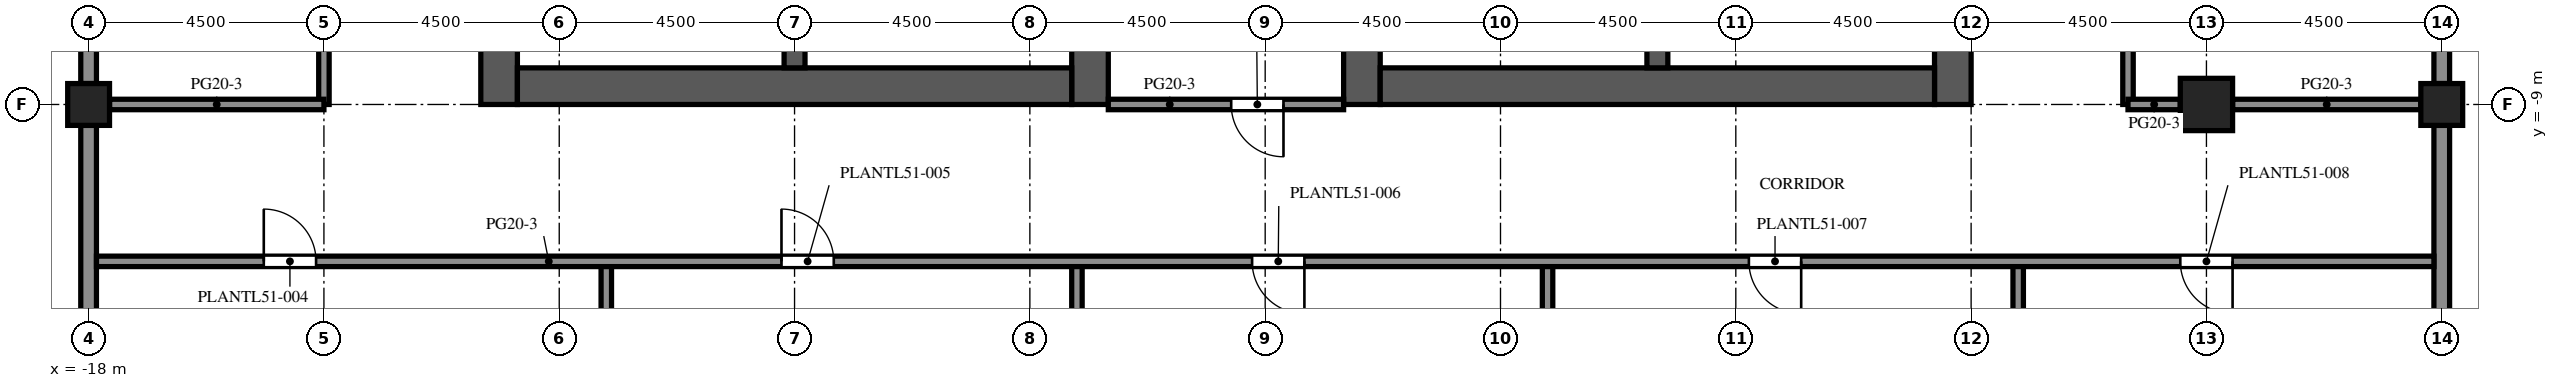
"""IFC4 building model, lengths in metres.
Left out: names, types, materials, properties, quantities, classifications, styles, units other than length and angle.
Written with IfcOpenShell. Run it as: python <this file> out.ifc"""

import sys

from ifc_helpers import new_model, si_unit, direction, frame, frame_2d, origin, origin_2d, place, context, subcontext, project, spatial, rectangle, extrude, element, fill, save


model = new_model("IFC4")
c1 = context("Model", 3, precision=1e-05, world=origin(), true_north=direction((0.0, 1.0)))
c2 = subcontext(c1, "Body", "Model", "MODEL_VIEW")
j1 = project(units=[si_unit("LENGTHUNIT", "METRE"), si_unit("PLANEANGLEUNIT", "RADIAN")], contexts=[c1])
p1 = place(None, origin())
s1 = spatial("IfcSite", under=j1, at=p1, CompositionType="ELEMENT")
p2 = place(p1, origin())
s2 = spatial("IfcBuilding", under=s1, at=p2, CompositionType="ELEMENT")
p3 = place(p2, frame((0.0, 0.0, 226.2)))
s3 = spatial("IfcBuildingStorey", under=s2, at=p3, CompositionType="ELEMENT", Elevation=226.2)
for number, where, z_axis, x_axis in (
    (1, (-18.0, -9.0, -0.6), (0.0, 0.0, 1.0), (1.0, 0.0, 0.0)),
    (2, (27.0, -9.0, -0.6), (0.0, 0.0, 1.0), (1.0, 0.0, 0.0)),
):
    element("IfcColumn", number, at=place(p3, frame(where, z_axis=z_axis, x_axis=x_axis)), inside=s3, PredefinedType="COLUMN", context=c2, shape_type="SweptSolid", body=[
        extrude(rectangle(XDim=0.8, YDim=0.8, at=origin_2d()), origin(), (0.0, 0.0, 1.0), 6.0),
    ])
p4 = place(p3, frame((22.5, -9.0, 0.0), z_axis=(0.0, 0.0, 1.0), x_axis=(1.0, 0.0, 0.0)))
e3 = element("IfcColumn", 3, at=p4, inside=s3, PredefinedType="COLUMN", context=c2, shape_type="SweptSolid", body=[
    extrude(rectangle(XDim=1.0, YDim=1.0, at=origin_2d()), origin(), (0.0, 0.0, 1.0), 5.4),
])
p5 = place(p3, frame((-10.15, -9.0, 0.0), z_axis=(0.0, 0.0, 1.0), x_axis=(0.0, 1.0, 0.0)))
e4 = element("IfcWall", 4, at=p5, inside=s3, PredefinedType="SHEAR", context=c2, shape_type="SweptSolid", body=[
    extrude(rectangle(XDim=27.5, YDim=0.7, at=frame_2d((13.75, 0.0))), origin(), (0.0, 0.0, 1.0), 5.4),
])
p6 = place(p5, frame((12.55, 0.0, 0.0)))
e5 = element("IfcOpeningElement", 5, at=p6, cuts=e4, PredefinedType="OPENING", context=c2, shape_type="SweptSolid", body=[
    extrude(rectangle(XDim=2.4, YDim=2.4, at=frame_2d((1.2, 1.2))), frame((0.0, 0.36, 0.0), z_axis=(0.0, -1.0, 0.0), x_axis=(1.0, 0.0, 0.0)), (0.0, 0.0, 1.0), 0.72),
])
p7 = place(p5, frame((6.825, 0.0, 0.0)))
e6 = element("IfcOpeningElement", 6, at=p7, cuts=e4, PredefinedType="OPENING", context=c2, shape_type="SweptSolid", body=[
    extrude(rectangle(XDim=1.2, YDim=2.1, at=frame_2d((0.6, 1.05))), frame((0.0, 0.36, 0.0), z_axis=(0.0, -1.0, 0.0), x_axis=(1.0, 0.0, 0.0)), (0.0, 0.0, 1.0), 0.72),
])
p8 = place(p5, frame((19.475, 0.0, 0.0)))
e7 = element("IfcOpeningElement", 7, at=p8, cuts=e4, PredefinedType="OPENING", context=c2, shape_type="SweptSolid", body=[
    extrude(rectangle(XDim=1.2, YDim=2.1, at=frame_2d((0.6, 1.05))), frame((0.0, 0.36, 0.0), z_axis=(0.0, -1.0, 0.0), x_axis=(1.0, 0.0, 0.0)), (0.0, 0.0, 1.0), 0.72),
])
p9 = place(p3, frame((1.15, -9.0, 0.0), z_axis=(0.0, 0.0, 1.0), x_axis=(0.0, 1.0, 0.0)))
e8 = element("IfcWall", 8, at=p9, inside=s3, PredefinedType="SHEAR", context=c2, shape_type="SweptSolid", body=[
    extrude(rectangle(XDim=27.5, YDim=0.7, at=frame_2d((13.75, 0.0))), origin(), (0.0, 0.0, 1.0), 5.4),
])
p10 = place(p9, frame((12.55, 0.0, 0.0)))
e9 = element("IfcOpeningElement", 9, at=p10, cuts=e8, PredefinedType="OPENING", context=c2, shape_type="SweptSolid", body=[
    extrude(rectangle(XDim=2.4, YDim=2.4, at=frame_2d((1.2, 1.2))), frame((0.0, 0.36, 0.0), z_axis=(0.0, -1.0, 0.0), x_axis=(1.0, 0.0, 0.0)), (0.0, 0.0, 1.0), 0.72),
])
p11 = place(p9, frame((5.46, 0.0, 0.0)))
e10 = element("IfcOpeningElement", 10, at=p11, cuts=e8, PredefinedType="OPENING", context=c2, shape_type="SweptSolid", body=[
    extrude(rectangle(XDim=0.968, YDim=2.1, at=frame_2d((0.484, 1.05))), frame((0.0, 0.36, 0.0), z_axis=(0.0, -1.0, 0.0), x_axis=(1.0, 0.0, 0.0)), (0.0, 0.0, 1.0), 0.72),
])
p12 = place(p9, frame((23.54, 0.0, 0.0)))
e11 = element("IfcOpeningElement", 11, at=p12, cuts=e8, PredefinedType="OPENING", context=c2, shape_type="SweptSolid", body=[
    extrude(rectangle(XDim=1.2, YDim=2.1, at=frame_2d((0.6, 1.05))), frame((0.0, 0.36, 0.0), z_axis=(0.0, -1.0, 0.0), x_axis=(1.0, 0.0, 0.0)), (0.0, 0.0, 1.0), 0.72),
])
p13 = place(p3, frame((-9.8, -8.65, 0.0), z_axis=(0.0, 0.0, 1.0), x_axis=(1.0, 0.0, 0.0)))
e12 = element("IfcWall", 12, at=p13, inside=s3, PredefinedType="SHEAR", context=c2, shape_type="SweptSolid", body=[
    extrude(rectangle(XDim=10.6, YDim=0.7, at=frame_2d((5.3, 0.0))), origin(), (0.0, 0.0, 1.0), 5.4),
])
p14 = place(p3, frame((-4.5, -8.3, 0.0), z_axis=(0.0, 0.0, 1.0), x_axis=(0.0, 1.0, 0.0)))
e13 = element("IfcWall", 13, at=p14, inside=s3, PredefinedType="SHEAR", context=c2, shape_type="SweptSolid", body=[
    extrude(rectangle(XDim=7.6, YDim=0.4, at=frame_2d((3.8, 0.0))), origin(), (0.0, 0.0, 1.0), 5.4),
])
p15 = place(p3, frame((6.35, -9.0, 0.0), z_axis=(0.0, 0.0, 1.0), x_axis=(0.0, 1.0, 0.0)))
e14 = element("IfcWall", 14, at=p15, inside=s3, PredefinedType="SHEAR", context=c2, shape_type="SweptSolid", body=[
    extrude(rectangle(XDim=27.5, YDim=0.7, at=frame_2d((13.75, 0.0))), origin(), (0.0, 0.0, 1.0), 5.4),
])
p16 = place(p15, frame((12.55, 0.0, 0.0)))
e15 = element("IfcOpeningElement", 15, at=p16, cuts=e14, PredefinedType="OPENING", context=c2, shape_type="SweptSolid", body=[
    extrude(rectangle(XDim=2.4, YDim=2.4, at=frame_2d((1.2, 1.2))), frame((0.0, 0.36, 0.0), z_axis=(0.0, -1.0, 0.0), x_axis=(1.0, 0.0, 0.0)), (0.0, 0.0, 1.0), 0.72),
])
p17 = place(p15, frame((5.46, 0.0, 0.0)))
e16 = element("IfcOpeningElement", 16, at=p17, cuts=e14, PredefinedType="OPENING", context=c2, shape_type="SweptSolid", body=[
    extrude(rectangle(XDim=0.968, YDim=2.1, at=frame_2d((0.484, 1.05))), frame((0.0, 0.36, 0.0), z_axis=(0.0, -1.0, 0.0), x_axis=(1.0, 0.0, 0.0)), (0.0, 0.0, 1.0), 0.72),
])
p18 = place(p15, frame((23.54, 0.0, 0.0)))
e17 = element("IfcOpeningElement", 17, at=p18, cuts=e14, PredefinedType="OPENING", context=c2, shape_type="SweptSolid", body=[
    extrude(rectangle(XDim=1.2, YDim=2.1, at=frame_2d((0.6, 1.05))), frame((0.0, 0.36, 0.0), z_axis=(0.0, -1.0, 0.0), x_axis=(1.0, 0.0, 0.0)), (0.0, 0.0, 1.0), 0.72),
])
p19 = place(p3, frame((17.65, -9.0, 0.0), z_axis=(0.0, 0.0, 1.0), x_axis=(0.0, 1.0, 0.0)))
e18 = element("IfcWall", 18, at=p19, inside=s3, PredefinedType="SHEAR", context=c2, shape_type="SweptSolid", body=[
    extrude(rectangle(XDim=27.5, YDim=0.7, at=frame_2d((13.75, 0.0))), origin(), (0.0, 0.0, 1.0), 5.4),
])
p20 = place(p19, frame((12.55, 0.0, 0.0)))
e19 = element("IfcOpeningElement", 19, at=p20, cuts=e18, PredefinedType="OPENING", context=c2, shape_type="SweptSolid", body=[
    extrude(rectangle(XDim=2.4, YDim=2.4, at=frame_2d((1.2, 1.2))), frame((0.0, 0.36, 0.0), z_axis=(0.0, -1.0, 0.0), x_axis=(1.0, 0.0, 0.0)), (0.0, 0.0, 1.0), 0.72),
])
p21 = place(p19, frame((6.825, 0.0, 0.0)))
e20 = element("IfcOpeningElement", 20, at=p21, cuts=e18, PredefinedType="OPENING", context=c2, shape_type="SweptSolid", body=[
    extrude(rectangle(XDim=1.2, YDim=2.1, at=frame_2d((0.6, 1.05))), frame((0.0, 0.36, 0.0), z_axis=(0.0, -1.0, 0.0), x_axis=(1.0, 0.0, 0.0)), (0.0, 0.0, 1.0), 0.72),
])
p22 = place(p19, frame((19.475, 0.0, 0.0)))
e21 = element("IfcOpeningElement", 21, at=p22, cuts=e18, PredefinedType="OPENING", context=c2, shape_type="SweptSolid", body=[
    extrude(rectangle(XDim=1.2, YDim=2.1, at=frame_2d((0.6, 1.05))), frame((0.0, 0.36, 0.0), z_axis=(0.0, -1.0, 0.0), x_axis=(1.0, 0.0, 0.0)), (0.0, 0.0, 1.0), 0.72),
])
p23 = place(p3, frame((6.7, -8.65, 0.0), z_axis=(0.0, 0.0, 1.0), x_axis=(1.0, 0.0, 0.0)))
e22 = element("IfcWall", 22, at=p23, inside=s3, PredefinedType="SHEAR", context=c2, shape_type="SweptSolid", body=[
    extrude(rectangle(XDim=10.6, YDim=0.7, at=frame_2d((5.3, 0.0))), origin(), (0.0, 0.0, 1.0), 5.4),
])
p24 = place(p3, frame((12.0, -8.3, 0.0), z_axis=(0.0, 0.0, 1.0), x_axis=(0.0, 1.0, 0.0)))
e23 = element("IfcWall", 23, at=p24, inside=s3, PredefinedType="SHEAR", context=c2, shape_type="SweptSolid", body=[
    extrude(rectangle(XDim=7.6, YDim=0.4, at=frame_2d((3.8, 0.0))), origin(), (0.0, 0.0, 1.0), 5.4),
])
for number, where, z_axis, x_axis in (
    (24, (27.0, -9.4, 0.0), (0.0, 0.0, 1.0), (0.0, -1.0, 0.0)),
    (25, (27.0, -4.9, 0.0), (0.0, 0.0, 1.0), (0.0, -1.0, 0.0)),
    (26, (-18.0, -8.6, 0.0), (0.0, 0.0, 1.0), (0.0, 1.0, 0.0)),
    (27, (-18.0, -13.1, 0.0), (0.0, 0.0, 1.0), (0.0, 1.0, 0.0)),
):
    element("IfcWall", number, at=place(p3, frame(where, z_axis=z_axis, x_axis=x_axis)), inside=s3, PredefinedType="SOLIDWALL", context=c2, shape_type="SweptSolid", body=[
        extrude(rectangle(XDim=3.7, YDim=0.3, at=frame_2d((1.85, 0.0))), origin(), (0.0, 0.0, 1.0), 3.75),
    ])
for number, where, z_axis, x_axis in (
    (28, (-1.75, -8.3, 0.0), (0.0, 0.0, 1.0), (0.0, 1.0, 0.0)),
    (29, (9.25, -8.3, 0.0), (0.0, 0.0, 1.0), (0.0, 1.0, 0.0)),
):
    element("IfcWall", number, at=place(p3, frame(where, z_axis=z_axis, x_axis=x_axis)), inside=s3, PredefinedType="PARTITIONING", context=c2, shape_type="SweptSolid", body=[
        extrude(rectangle(XDim=4.56, YDim=0.1, at=frame_2d((2.28, 0.0))), origin(), (0.0, 0.0, 1.0), 4.95),
    ])
p25 = place(p3, frame((-13.5, -9.0, 0.0), z_axis=(0.0, 0.0, 1.0), x_axis=(0.0, 1.0, 0.0)))
e30 = element("IfcWall", 30, at=p25, inside=s3, PredefinedType="PARTITIONING", context=c2, shape_type="SweptSolid", body=[
    extrude(rectangle(XDim=27.5, YDim=0.2, at=frame_2d((13.75, 0.0))), origin(), (0.0, 0.0, 1.0), 4.95),
])
p26 = place(p25, frame((3.85, 0.0, 0.0)))
e31 = element("IfcOpeningElement", 31, at=p26, cuts=e30, PredefinedType="OPENING", context=c2, shape_type="SweptSolid", body=[
    extrude(rectangle(XDim=1.0, YDim=2.1, at=frame_2d((0.5, 1.05))), frame((0.0, 0.11, 0.0), z_axis=(0.0, -1.0, 0.0), x_axis=(1.0, 0.0, 0.0)), (0.0, 0.0, 1.0), 0.22),
])
p27 = place(p25, frame((12.6, 0.0, 0.0)))
e32 = element("IfcOpeningElement", 32, at=p27, cuts=e30, PredefinedType="OPENING", context=c2, shape_type="SweptSolid", body=[
    extrude(rectangle(XDim=1.0, YDim=2.1, at=frame_2d((0.5, 1.05))), frame((0.0, 0.11, 0.0), z_axis=(0.0, -1.0, 0.0), x_axis=(1.0, 0.0, 0.0)), (0.0, 0.0, 1.0), 0.22),
])
p28 = place(p25, frame((22.35, 0.0, 0.0)))
e33 = element("IfcOpeningElement", 33, at=p28, cuts=e30, PredefinedType="OPENING", context=c2, shape_type="SweptSolid", body=[
    extrude(rectangle(XDim=1.0, YDim=2.1, at=frame_2d((0.5, 1.05))), frame((0.0, 0.11, 0.0), z_axis=(0.0, -1.0, 0.0), x_axis=(1.0, 0.0, 0.0)), (0.0, 0.0, 1.0), 0.22),
])
for number, where, z_axis, x_axis in (
    (34, (-8.1, -22.35, 0.0), (0.0, 0.0, 1.0), (0.0, 1.0, 0.0)),
    (35, (0.9, -22.35, 0.0), (0.0, 0.0, 1.0), (0.0, 1.0, 0.0)),
    (36, (9.9, -22.35, 0.0), (0.0, 0.0, 1.0), (0.0, 1.0, 0.0)),
    (37, (18.9, -22.35, 0.0), (0.0, 0.0, 1.0), (0.0, 1.0, 0.0)),
):
    element("IfcWall", number, at=place(p3, frame(where, z_axis=z_axis, x_axis=x_axis)), inside=s3, PredefinedType="PARTITIONING", context=c2, shape_type="SweptSolid", body=[
        extrude(rectangle(XDim=10.35, YDim=0.2, at=frame_2d((5.175, 0.0))), origin(), (0.0, 0.0, 1.0), 4.95),
    ])
p29 = place(p3, frame((21.0, 18.5, 0.0), z_axis=(0.0, 0.0, 1.0), x_axis=(0.0, -1.0, 0.0)))
e38 = element("IfcWall", 38, at=p29, inside=s3, PredefinedType="PARTITIONING", context=c2, shape_type="SweptSolid", body=[
    extrude(rectangle(XDim=27.5, YDim=0.2, at=frame_2d((13.75, 0.0))), origin(), (0.0, 0.0, 1.0), 4.95),
])
p30 = place(p29, frame((21.4, 0.0, 0.0)))
e39 = element("IfcOpeningElement", 39, at=p30, cuts=e38, PredefinedType="OPENING", context=c2, shape_type="SweptSolid", body=[
    extrude(rectangle(XDim=1.0, YDim=2.1, at=frame_2d((0.5, 1.05))), frame((0.0, 0.11, 0.0), z_axis=(0.0, -1.0, 0.0), x_axis=(1.0, 0.0, 0.0)), (0.0, 0.0, 1.0), 0.22),
])
p31 = place(p29, frame((12.65, 0.0, 0.0)))
e40 = element("IfcOpeningElement", 40, at=p31, cuts=e38, PredefinedType="OPENING", context=c2, shape_type="SweptSolid", body=[
    extrude(rectangle(XDim=1.0, YDim=2.1, at=frame_2d((0.5, 1.05))), frame((0.0, 0.11, 0.0), z_axis=(0.0, -1.0, 0.0), x_axis=(1.0, 0.0, 0.0)), (0.0, 0.0, 1.0), 0.22),
])
p32 = place(p29, frame((5.15, 0.0, 0.0)))
e41 = element("IfcOpeningElement", 41, at=p32, cuts=e38, PredefinedType="OPENING", context=c2, shape_type="SweptSolid", body=[
    extrude(rectangle(XDim=1.0, YDim=2.1, at=frame_2d((0.5, 1.05))), frame((0.0, 0.11, 0.0), z_axis=(0.0, -1.0, 0.0), x_axis=(1.0, 0.0, 0.0)), (0.0, 0.0, 1.0), 0.22),
])
p33 = place(p3, frame((26.85, -12.0, 0.0), z_axis=(0.0, 0.0, 1.0), x_axis=(-1.0, 0.0, 0.0)))
e42 = element("IfcWall", 42, at=p33, inside=s3, PredefinedType="PARTITIONING", context=c2, shape_type="SweptSolid", body=[
    extrude(rectangle(XDim=44.7, YDim=0.2, at=frame_2d((22.35, 0.0))), origin(), (0.0, 0.0, 1.0), 4.95),
])
p34 = place(p33, frame((40.5, 0.0, 0.0)))
e43 = element("IfcOpeningElement", 43, at=p34, cuts=e42, PredefinedType="OPENING", context=c2, shape_type="SweptSolid", body=[
    extrude(rectangle(XDim=1.0, YDim=2.1, at=frame_2d((0.5, 1.05))), frame((0.0, 0.11, 0.0), z_axis=(0.0, -1.0, 0.0), x_axis=(1.0, 0.0, 0.0)), (0.0, 0.0, 1.0), 0.22),
])
p35 = place(p33, frame((30.6, 0.0, 0.0)))
e44 = element("IfcOpeningElement", 44, at=p35, cuts=e42, PredefinedType="OPENING", context=c2, shape_type="SweptSolid", body=[
    extrude(rectangle(XDim=1.0, YDim=2.1, at=frame_2d((0.5, 1.05))), frame((0.0, 0.11, 0.0), z_axis=(0.0, -1.0, 0.0), x_axis=(1.0, 0.0, 0.0)), (0.0, 0.0, 1.0), 0.22),
])
p36 = place(p33, frame((21.6, 0.0, 0.0)))
e45 = element("IfcOpeningElement", 45, at=p36, cuts=e42, PredefinedType="OPENING", context=c2, shape_type="SweptSolid", body=[
    extrude(rectangle(XDim=1.0, YDim=2.1, at=frame_2d((0.5, 1.05))), frame((0.0, 0.11, 0.0), z_axis=(0.0, -1.0, 0.0), x_axis=(1.0, 0.0, 0.0)), (0.0, 0.0, 1.0), 0.22),
])
p37 = place(p33, frame((12.1, 0.0, 0.0)))
e46 = element("IfcOpeningElement", 46, at=p37, cuts=e42, PredefinedType="OPENING", context=c2, shape_type="SweptSolid", body=[
    extrude(rectangle(XDim=1.0, YDim=2.1, at=frame_2d((0.5, 1.05))), frame((0.0, 0.11, 0.0), z_axis=(0.0, -1.0, 0.0), x_axis=(1.0, 0.0, 0.0)), (0.0, 0.0, 1.0), 0.22),
])
p38 = place(p33, frame((3.85, 0.0, 0.0)))
e47 = element("IfcOpeningElement", 47, at=p38, cuts=e42, PredefinedType="OPENING", context=c2, shape_type="SweptSolid", body=[
    extrude(rectangle(XDim=1.0, YDim=2.1, at=frame_2d((0.5, 1.05))), frame((0.0, 0.11, 0.0), z_axis=(0.0, -1.0, 0.0), x_axis=(1.0, 0.0, 0.0)), (0.0, 0.0, 1.0), 0.22),
])
p39 = place(p3, frame((-17.6, -9.0, 0.0), z_axis=(0.0, 0.0, 1.0), x_axis=(1.0, 0.0, 0.0)))
e48 = element("IfcWall", 48, at=p39, inside=s3, PredefinedType="PARTITIONING", context=c2, shape_type="SweptSolid", body=[
    extrude(rectangle(XDim=4.1, YDim=0.2, at=frame_2d((2.05, 0.0))), origin(), (0.0, 0.0, 1.0), 4.95),
])
p40 = place(p3, frame((1.5, -9.0, 0.0), z_axis=(0.0, 0.0, 1.0), x_axis=(1.0, 0.0, 0.0)))
e49 = element("IfcWall", 49, at=p40, inside=s3, PredefinedType="PARTITIONING", context=c2, shape_type="SweptSolid", body=[
    extrude(rectangle(XDim=4.5, YDim=0.2, at=frame_2d((2.25, 0.0))), origin(), (0.0, 0.0, 1.0), 4.95),
])
p41 = place(p40, frame((2.35, 0.0, 0.0)))
e50 = element("IfcOpeningElement", 50, at=p41, cuts=e49, PredefinedType="OPENING", context=c2, shape_type="SweptSolid", body=[
    extrude(rectangle(XDim=1.0, YDim=2.1, at=frame_2d((0.5, 1.05))), frame((0.0, 0.11, 0.0), z_axis=(0.0, -1.0, 0.0), x_axis=(1.0, 0.0, 0.0)), (0.0, 0.0, 1.0), 0.22),
])
p42 = place(p3, frame((21.0, -9.0, 0.0), z_axis=(0.0, 0.0, 1.0), x_axis=(1.0, 0.0, 0.0)))
e51 = element("IfcWall", 51, at=p42, inside=s3, PredefinedType="PARTITIONING", context=c2, shape_type="SweptSolid", body=[
    extrude(rectangle(XDim=1.0, YDim=0.2, at=frame_2d((0.5, 0.0))), origin(), (0.0, 0.0, 1.0), 4.95),
])
p43 = place(p3, frame((23.0, -9.0, 0.0), z_axis=(0.0, 0.0, 1.0), x_axis=(1.0, 0.0, 0.0)))
e52 = element("IfcWall", 52, at=p43, inside=s3, PredefinedType="PARTITIONING", context=c2, shape_type="SweptSolid", body=[
    extrude(rectangle(XDim=3.6, YDim=0.2, at=frame_2d((1.8, 0.0))), origin(), (0.0, 0.0, 1.0), 4.95),
])
p44 = place(p34, origin())
e53 = element("IfcDoor", 53, at=p44, inside=s3, OperationType="SINGLE_SWING_RIGHT", PredefinedType="DOOR", context=c2, shape_type="SweptSolid", body=[
    extrude(rectangle(XDim=1.0, YDim=2.1, at=frame_2d((0.5, 1.05))), frame((0.0, 0.025, 0.0), z_axis=(0.0, -1.0, 0.0), x_axis=(1.0, 0.0, 0.0)), (0.0, 0.0, 1.0), 0.05),
])
fill(e43, e53)
p45 = place(p35, origin())
e54 = element("IfcDoor", 54, at=p45, inside=s3, OperationType="SINGLE_SWING_RIGHT", PredefinedType="DOOR", context=c2, shape_type="SweptSolid", body=[
    extrude(rectangle(XDim=1.0, YDim=2.1, at=frame_2d((0.5, 1.05))), frame((0.0, 0.025, 0.0), z_axis=(0.0, -1.0, 0.0), x_axis=(1.0, 0.0, 0.0)), (0.0, 0.0, 1.0), 0.05),
])
fill(e44, e54)
p46 = place(p36, origin())
e55 = element("IfcDoor", 55, at=p46, inside=s3, OperationType="SINGLE_SWING_LEFT", PredefinedType="DOOR", context=c2, shape_type="SweptSolid", body=[
    extrude(rectangle(XDim=1.0, YDim=2.1, at=frame_2d((0.5, 1.05))), frame((0.0, 0.025, 0.0), z_axis=(0.0, -1.0, 0.0), x_axis=(1.0, 0.0, 0.0)), (0.0, 0.0, 1.0), 0.05),
])
fill(e45, e55)
p47 = place(p37, origin())
e56 = element("IfcDoor", 56, at=p47, inside=s3, OperationType="SINGLE_SWING_LEFT", PredefinedType="DOOR", context=c2, shape_type="SweptSolid", body=[
    extrude(rectangle(XDim=1.0, YDim=2.1, at=frame_2d((0.5, 1.05))), frame((0.0, 0.025, 0.0), z_axis=(0.0, -1.0, 0.0), x_axis=(1.0, 0.0, 0.0)), (0.0, 0.0, 1.0), 0.05),
])
fill(e46, e56)
p48 = place(p38, origin())
e57 = element("IfcDoor", 57, at=p48, inside=s3, OperationType="SINGLE_SWING_LEFT", PredefinedType="DOOR", context=c2, shape_type="SweptSolid", body=[
    extrude(rectangle(XDim=1.0, YDim=2.1, at=frame_2d((0.5, 1.05))), frame((0.0, 0.025, 0.0), z_axis=(0.0, -1.0, 0.0), x_axis=(1.0, 0.0, 0.0)), (0.0, 0.0, 1.0), 0.05),
])
fill(e47, e57)
p49 = place(p41, origin())
e58 = element("IfcDoor", 58, at=p49, inside=s3, OperationType="SINGLE_SWING_RIGHT", PredefinedType="DOOR", context=c2, shape_type="SweptSolid", body=[
    extrude(rectangle(XDim=1.0, YDim=2.1, at=frame_2d((0.5, 1.05))), frame((0.0, 0.025, 0.0), z_axis=(0.0, -1.0, 0.0), x_axis=(1.0, 0.0, 0.0)), (0.0, 0.0, 1.0), 0.05),
])
fill(e50, e58)
save(model, sys.argv[1])
